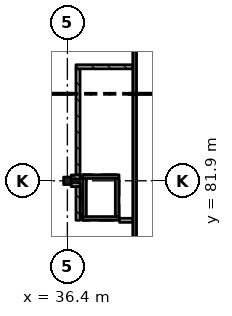
"""IFC4 building model, lengths in metres.
Left out: names, types, materials, properties, quantities, classifications, styles, units other than length and angle.
Written with IfcOpenShell. Run it as: python <this file> out.ifc"""

import sys

from ifc_helpers import new_model, si_unit, direction, frame, frame_2d, origin, origin_2d, place, context, subcontext, project, spatial, rectangle, extrude, element, fill, save


model = new_model("IFC4")
c1 = context("Model", 3, precision=1e-05, world=origin(), true_north=direction((0.0, 1.0)))
c2 = subcontext(c1, "Body", "Model", "MODEL_VIEW")
j1 = project(units=[si_unit("LENGTHUNIT", "METRE"), si_unit("PLANEANGLEUNIT", "RADIAN")], contexts=[c1])
p1 = place(None, origin())
s1 = spatial("IfcSite", under=j1, at=p1, CompositionType="ELEMENT")
p2 = place(p1, origin())
s2 = spatial("IfcBuilding", under=s1, at=p2, CompositionType="ELEMENT")
p3 = place(p2, frame((0.0, 0.0, 29.12)))
s3 = spatial("IfcBuildingStorey", under=s2, at=p3, CompositionType="ELEMENT", Elevation=29.12)
p4 = place(p3, frame((36.4, 81.9, 0.0), z_axis=(0.0, 0.0, 1.0), x_axis=(1.0, 0.0, 0.0)))
e1 = element("IfcColumn", 1, at=p4, inside=s3, PredefinedType="COLUMN", context=c2, shape_type="SweptSolid", body=[
    extrude(rectangle(XDim=0.5, YDim=0.5, at=origin_2d()), origin(), (0.0, 0.0, 1.0), 4.55),
])
p5 = place(p3, frame((40.825, 68.25, 0.0), z_axis=(0.0, 0.0, 1.0), x_axis=(0.0, 1.0, 0.0)))
e2 = element("IfcWall", 2, at=p5, inside=s3, PredefinedType="SHEAR", context=c2, shape_type="SweptSolid", body=[
    extrude(rectangle(XDim=40.775, YDim=0.25, at=frame_2d((20.387, 0.0))), origin(), (0.0, 0.0, 1.0), 4.55),
])
p6 = place(p3, frame((39.8, 79.425, 0.0), z_axis=(0.0, 0.0, 1.0), x_axis=(-1.0, 0.0, 0.0)))
e3 = element("IfcWall", 3, at=p6, inside=s3, PredefinedType="SHEAR", context=c2, shape_type="SweptSolid", body=[
    extrude(rectangle(XDim=2.4, YDim=0.25, at=frame_2d((1.2, 0.0))), origin(), (0.0, 0.0, 1.0), 4.55),
])
p7 = place(p6, frame((0.75, 0.0, 0.0)))
e4 = element("IfcOpeningElement", 4, at=p7, cuts=e3, PredefinedType="OPENING", context=c2, shape_type="SweptSolid", body=[
    extrude(rectangle(XDim=0.9, YDim=2.1, at=frame_2d((0.45, 1.05))), frame((0.0, 0.135, 0.0), z_axis=(0.0, -1.0, 0.0), x_axis=(1.0, 0.0, 0.0)), (0.0, 0.0, 1.0), 0.27),
])
p8 = place(p3, frame((39.8, 82.175, 0.0), z_axis=(0.0, 0.0, 1.0), x_axis=(-1.0, 0.0, 0.0)))
e5 = element("IfcWall", 5, at=p8, inside=s3, PredefinedType="SHEAR", context=c2, shape_type="SweptSolid", body=[
    extrude(rectangle(XDim=2.4, YDim=0.25, at=frame_2d((1.2, 0.0))), origin(), (0.0, 0.0, 1.0), 4.55),
])
for number, where, z_axis, x_axis in (
    (6, (37.525, 82.05, 0.0), (0.0, 0.0, 1.0), (0.0, -1.0, 0.0)),
    (7, (39.675, 82.05, 0.0), (0.0, 0.0, 1.0), (0.0, -1.0, 0.0)),
):
    element("IfcWall", number, at=place(p3, frame(where, z_axis=z_axis, x_axis=x_axis)), inside=s3, PredefinedType="SHEAR", context=c2, shape_type="SweptSolid", body=[
        extrude(rectangle(XDim=2.5, YDim=0.25, at=frame_2d((1.25, 0.0))), origin(), (0.0, 0.0, 1.0), 4.55),
    ])
p9 = place(p3, frame((36.65, 81.65, 0.0), z_axis=(0.0, 0.0, 1.0), x_axis=(1.0, 0.0, 0.0)))
e8 = element("IfcWall", 8, at=p9, inside=s3, PredefinedType="SOLIDWALL", context=c2, shape_type="SweptSolid", body=[
    extrude(rectangle(XDim=0.588, YDim=0.275, at=frame_2d((0.294, 0.0))), origin(), (0.0, 0.0, 1.0), 3.88),
])
p10 = place(p3, frame((37.1, 81.512, 0.0), z_axis=(0.0, 0.0, 1.0), x_axis=(0.0, -1.0, 0.0)))
e9 = element("IfcWall", 9, at=p10, inside=s3, PredefinedType="SOLIDWALL", context=c2, shape_type="SweptSolid", body=[
    extrude(rectangle(XDim=2.212, YDim=0.275, at=frame_2d((1.106, 0.0))), origin(), (0.0, 0.0, 1.0), 3.88),
])
p11 = place(p3, frame((37.1, 89.262, 0.0), z_axis=(0.0, 0.0, 1.0), x_axis=(0.0, -1.0, 0.0)))
e10 = element("IfcWall", 10, at=p11, inside=s3, PredefinedType="SOLIDWALL", context=c2, shape_type="SweptSolid", body=[
    extrude(rectangle(XDim=6.975, YDim=0.275, at=frame_2d((3.487, 0.0))), origin(), (0.0, 0.0, 1.0), 3.88),
])
p12 = place(p3, frame((37.238, 82.15, 0.0), z_axis=(0.0, 0.0, 1.0), x_axis=(-1.0, 0.0, 0.0)))
e11 = element("IfcWall", 11, at=p12, inside=s3, PredefinedType="SOLIDWALL", context=c2, shape_type="SweptSolid", body=[
    extrude(rectangle(XDim=0.588, YDim=0.275, at=frame_2d((0.294, 0.0))), origin(), (0.0, 0.0, 1.0), 3.88),
])
p13 = place(p3, frame((40.7, 79.3, 0.0), z_axis=(0.0, 0.0, 1.0), x_axis=(-1.0, 0.0, 0.0)))
e12 = element("IfcWall", 12, at=p13, inside=s3, PredefinedType="SOLIDWALL", context=c2, shape_type="SweptSolid", body=[
    extrude(rectangle(XDim=0.87, YDim=0.275, at=frame_2d((0.435, 0.0))), origin(), (0.0, 0.0, 1.0), 3.88),
])
p14 = place(p3, frame((40.7, 89.4, 0.0), z_axis=(0.0, 0.0, 1.0), x_axis=(-1.0, 0.0, 0.0)))
e13 = element("IfcWall", 13, at=p14, inside=s3, PredefinedType="SOLIDWALL", context=c2, shape_type="SweptSolid", body=[
    extrude(rectangle(XDim=3.738, YDim=0.275, at=frame_2d((1.869, 0.0))), origin(), (0.0, 0.0, 1.0), 3.88),
])
p15 = place(p14, frame((1.25, 0.0, 0.0)))
e14 = element("IfcOpeningElement", 14, at=p15, cuts=e13, PredefinedType="OPENING", context=c2, shape_type="SweptSolid", body=[
    extrude(rectangle(XDim=1.2, YDim=2.4, at=frame_2d((0.6, 1.2))), frame((0.0, 0.147, 0.0), z_axis=(0.0, -1.0, 0.0), x_axis=(1.0, 0.0, 0.0)), (0.0, 0.0, 1.0), 0.295),
])
p16 = place(p15, origin())
e15 = element("IfcDoor", 15, at=p16, inside=s3, OperationType="SINGLE_SWING_RIGHT", PredefinedType="DOOR", context=c2, shape_type="SweptSolid", body=[
    extrude(rectangle(XDim=1.2, YDim=2.4, at=frame_2d((0.6, 1.2))), frame((0.0, 0.025, 0.0), z_axis=(0.0, -1.0, 0.0), x_axis=(1.0, 0.0, 0.0)), (0.0, 0.0, 1.0), 0.05),
])
fill(e14, e15)
p17 = place(p7, origin())
e16 = element("IfcDoor", 16, at=p17, inside=s3, OperationType="SINGLE_SWING_RIGHT", PredefinedType="DOOR", context=c2, shape_type="SweptSolid", body=[
    extrude(rectangle(XDim=0.9, YDim=2.1, at=frame_2d((0.45, 1.05))), frame((0.0, 0.025, 0.0), z_axis=(0.0, -1.0, 0.0), x_axis=(1.0, 0.0, 0.0)), (0.0, 0.0, 1.0), 0.05),
])
fill(e4, e16)
save(model, sys.argv[1])
